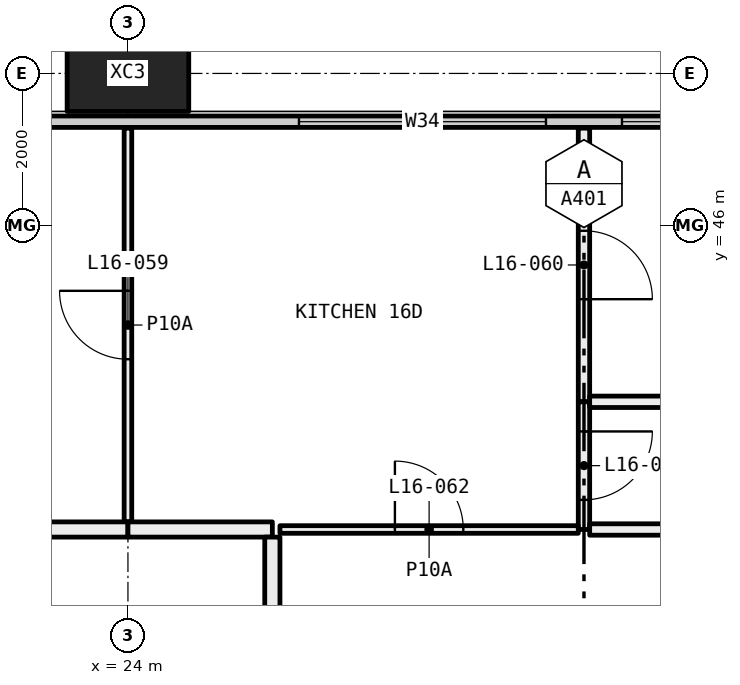
"""IFC4 building model, lengths in metres.
Left out: names, types, materials, properties, quantities, classifications, styles, units other than length and angle.
Written with IfcOpenShell. Run it as: python <this file> out.ifc"""

import sys

from ifc_helpers import new_model, si_unit, direction, frame, frame_2d, origin, origin_2d, place, context, subcontext, project, spatial, rectangle, hollow_rectangle, extrude, element, fill, save


model = new_model("IFC4")
c1 = context("Model", 3, precision=1e-05, world=origin(), true_north=direction((0.0, 1.0)))
c2 = subcontext(c1, "Body", "Model", "MODEL_VIEW")
j1 = project(units=[si_unit("LENGTHUNIT", "METRE"), si_unit("PLANEANGLEUNIT", "RADIAN")], contexts=[c1])
p1 = place(None, origin())
s1 = spatial("IfcSite", under=j1, at=p1, CompositionType="ELEMENT")
p2 = place(p1, origin())
s2 = spatial("IfcBuilding", under=s1, at=p2, CompositionType="ELEMENT")
p3 = place(p2, frame((0.0, 0.0, 67.95)))
s3 = spatial("IfcBuildingStorey", under=s2, at=p3, CompositionType="ELEMENT", Elevation=67.95)
p4 = place(p3, frame((24.0, 48.0, -0.4), z_axis=(0.0, 0.0, 1.0), x_axis=(1.0, 0.0, 0.0)))
e1 = element("IfcColumn", 1, at=p4, inside=s3, PredefinedType="COLUMN", context=c2, shape_type="SweptSolid", body=[
    extrude(hollow_rectangle(XDim=1.6, YDim=1.0, WallThickness=0.065, at=origin_2d()), origin(), (0.0, 0.0, 1.0), 3.45),
])
p5 = place(p3, frame((6.56, 47.365, 0.0), z_axis=(0.0, 0.0, 1.0), x_axis=(1.0, 0.0, 0.0)))
e2 = element("IfcWall", 2, at=p5, inside=s3, PredefinedType="ELEMENTEDWALL", context=c2, shape_type="SweptSolid", body=[
    extrude(rectangle(XDim=58.88, YDim=0.15, at=frame_2d((29.44, 0.0))), origin(), (0.0, 0.0, 1.0), 3.05),
])
p6 = place(p5, frame((0.44, 0.0, 0.45)))
e3 = element("IfcOpeningElement", 3, at=p6, cuts=e2, PredefinedType="OPENING", context=c2, shape_type="SweptSolid", body=[
    extrude(rectangle(XDim=4.5, YDim=2.55, at=frame_2d((2.25, 1.275))), frame((0.0, 0.085, 0.0), z_axis=(0.0, -1.0, 0.0), x_axis=(1.0, 0.0, 0.0)), (0.0, 0.0, 1.0), 0.17),
])
p7 = place(p5, frame((7.69, 0.0, 0.45)))
e4 = element("IfcOpeningElement", 4, at=p7, cuts=e2, PredefinedType="OPENING", context=c2, shape_type="SweptSolid", body=[
    extrude(rectangle(XDim=3.25, YDim=2.55, at=frame_2d((1.625, 1.275))), frame((0.0, 0.085, 0.0), z_axis=(0.0, -1.0, 0.0), x_axis=(1.0, 0.0, 0.0)), (0.0, 0.0, 1.0), 0.17),
])
p8 = place(p5, frame((11.94, 0.0, 0.45)))
e5 = element("IfcOpeningElement", 5, at=p8, cuts=e2, PredefinedType="OPENING", context=c2, shape_type="SweptSolid", body=[
    extrude(rectangle(XDim=3.25, YDim=2.55, at=frame_2d((1.625, 1.275))), frame((0.0, 0.085, 0.0), z_axis=(0.0, -1.0, 0.0), x_axis=(1.0, 0.0, 0.0)), (0.0, 0.0, 1.0), 0.17),
])
p9 = place(p5, frame((19.69, 0.0, 0.45)))
e6 = element("IfcOpeningElement", 6, at=p9, cuts=e2, PredefinedType="OPENING", context=c2, shape_type="SweptSolid", body=[
    extrude(rectangle(XDim=3.25, YDim=2.55, at=frame_2d((1.625, 1.275))), frame((0.0, 0.085, 0.0), z_axis=(0.0, -1.0, 0.0), x_axis=(1.0, 0.0, 0.0)), (0.0, 0.0, 1.0), 0.17),
])
p10 = place(p5, frame((23.94, 0.0, 0.45)))
e7 = element("IfcOpeningElement", 7, at=p10, cuts=e2, PredefinedType="OPENING", context=c2, shape_type="SweptSolid", body=[
    extrude(rectangle(XDim=2.0, YDim=2.55, at=frame_2d((1.0, 1.275))), frame((0.0, 0.085, 0.0), z_axis=(0.0, -1.0, 0.0), x_axis=(1.0, 0.0, 0.0)), (0.0, 0.0, 1.0), 0.17),
])
p11 = place(p5, frame((31.69, 0.0, 0.45)))
e8 = element("IfcOpeningElement", 8, at=p11, cuts=e2, PredefinedType="OPENING", context=c2, shape_type="SweptSolid", body=[
    extrude(rectangle(XDim=3.25, YDim=2.55, at=frame_2d((1.625, 1.275))), frame((0.0, 0.085, 0.0), z_axis=(0.0, -1.0, 0.0), x_axis=(1.0, 0.0, 0.0)), (0.0, 0.0, 1.0), 0.17),
])
p12 = place(p5, frame((35.94, 0.0, 0.45)))
e9 = element("IfcOpeningElement", 9, at=p12, cuts=e2, PredefinedType="OPENING", context=c2, shape_type="SweptSolid", body=[
    extrude(rectangle(XDim=3.25, YDim=2.55, at=frame_2d((1.625, 1.275))), frame((0.0, 0.085, 0.0), z_axis=(0.0, -1.0, 0.0), x_axis=(1.0, 0.0, 0.0)), (0.0, 0.0, 1.0), 0.17),
])
p13 = place(p5, frame((43.69, 0.0, 0.45)))
e10 = element("IfcOpeningElement", 10, at=p13, cuts=e2, PredefinedType="OPENING", context=c2, shape_type="SweptSolid", body=[
    extrude(rectangle(XDim=3.25, YDim=2.55, at=frame_2d((1.625, 1.275))), frame((0.0, 0.085, 0.0), z_axis=(0.0, -1.0, 0.0), x_axis=(1.0, 0.0, 0.0)), (0.0, 0.0, 1.0), 0.17),
])
p14 = place(p5, frame((47.94, 0.0, 0.45)))
e11 = element("IfcOpeningElement", 11, at=p14, cuts=e2, PredefinedType="OPENING", context=c2, shape_type="SweptSolid", body=[
    extrude(rectangle(XDim=2.0, YDim=2.55, at=frame_2d((1.0, 1.275))), frame((0.0, 0.085, 0.0), z_axis=(0.0, -1.0, 0.0), x_axis=(1.0, 0.0, 0.0)), (0.0, 0.0, 1.0), 0.17),
])
p15 = place(p5, frame((53.94, 0.0, 0.45)))
e12 = element("IfcOpeningElement", 12, at=p15, cuts=e2, PredefinedType="OPENING", context=c2, shape_type="SweptSolid", body=[
    extrude(rectangle(XDim=4.5, YDim=2.55, at=frame_2d((2.25, 1.275))), frame((0.0, 0.085, 0.0), z_axis=(0.0, -1.0, 0.0), x_axis=(1.0, 0.0, 0.0)), (0.0, 0.0, 1.0), 0.17),
])
p16 = place(p3, frame((24.0, 42.1, 0.0), z_axis=(0.0, 0.0, 1.0), x_axis=(0.0, 1.0, 0.0)))
e13 = element("IfcWall", 13, at=p16, inside=s3, PredefinedType="PARTITIONING", context=c2, shape_type="SweptSolid", body=[
    extrude(rectangle(XDim=5.18, YDim=0.1, at=frame_2d((2.59, 0.0))), origin(), (0.0, 0.0, 1.0), 3.05),
])
p17 = place(p16, frame((2.14, 0.0, 0.0)))
e14 = element("IfcOpeningElement", 14, at=p17, cuts=e13, PredefinedType="OPENING", context=c2, shape_type="SweptSolid", body=[
    extrude(rectangle(XDim=0.9, YDim=2.1, at=frame_2d((0.45, 1.05))), frame((0.0, 0.06, 0.0), z_axis=(0.0, -1.0, 0.0), x_axis=(1.0, 0.0, 0.0)), (0.0, 0.0, 1.0), 0.12),
])
p18 = place(p3, frame((18.0, 42.0, 0.0), z_axis=(0.0, 0.0, 1.0), x_axis=(1.0, 0.0, 0.0)))
e15 = element("IfcWall", 15, at=p18, inside=s3, PredefinedType="PARTITIONING", context=c2, shape_type="SweptSolid", body=[
    extrude(rectangle(XDim=6.0, YDim=0.2, at=frame_2d((3.0, 0.0))), origin(), (0.0, 0.0, 1.0), 3.05),
])
p19 = place(p3, frame((30.0, 43.68, 0.0), z_axis=(0.0, 0.0, 1.0), x_axis=(0.0, 1.0, 0.0)))
e16 = element("IfcWall", 16, at=p19, inside=s3, PredefinedType="PARTITIONING", context=c2, shape_type="SweptSolid", body=[
    extrude(rectangle(XDim=3.6, YDim=0.15, at=frame_2d((1.8, 0.0))), origin(), (0.0, 0.0, 1.0), 3.05),
])
p20 = place(p19, frame((1.35, 0.0, 0.0)))
e17 = element("IfcOpeningElement", 17, at=p20, cuts=e16, PredefinedType="OPENING", context=c2, shape_type="SweptSolid", body=[
    extrude(rectangle(XDim=0.9, YDim=2.1, at=frame_2d((0.45, 1.05))), frame((0.0, 0.085, 0.0), z_axis=(0.0, -1.0, 0.0), x_axis=(1.0, 0.0, 0.0)), (0.0, 0.0, 1.0), 0.17),
])
p21 = place(p3, frame((30.0, 42.0, 0.0), z_axis=(0.0, 0.0, 1.0), x_axis=(0.0, 1.0, 0.0)))
e18 = element("IfcWall", 18, at=p21, inside=s3, PredefinedType="PARTITIONING", context=c2, shape_type="SweptSolid", body=[
    extrude(rectangle(XDim=1.68, YDim=0.15, at=frame_2d((0.84, 0.0))), origin(), (0.0, 0.0, 1.0), 3.05),
])
p22 = place(p21, frame((0.39, 0.0, 0.0)))
e19 = element("IfcOpeningElement", 19, at=p22, cuts=e18, PredefinedType="OPENING", context=c2, shape_type="SweptSolid", body=[
    extrude(rectangle(XDim=0.9, YDim=2.1, at=frame_2d((0.45, 1.05))), frame((0.0, 0.085, 0.0), z_axis=(0.0, -1.0, 0.0), x_axis=(1.0, 0.0, 0.0)), (0.0, 0.0, 1.0), 0.17),
])
p23 = place(p3, frame((26.0, 42.0, 0.0), z_axis=(0.0, 0.0, 1.0), x_axis=(1.0, 0.0, 0.0)))
e20 = element("IfcWall", 20, at=p23, inside=s3, PredefinedType="PARTITIONING", context=c2, shape_type="SweptSolid", body=[
    extrude(rectangle(XDim=3.925, YDim=0.1, at=frame_2d((1.962, 0.0))), origin(), (0.0, 0.0, 1.0), 3.05),
])
p24 = place(p23, frame((1.512, 0.0, 0.0)))
e21 = element("IfcOpeningElement", 21, at=p24, cuts=e20, PredefinedType="OPENING", context=c2, shape_type="SweptSolid", body=[
    extrude(rectangle(XDim=0.9, YDim=2.1, at=frame_2d((0.45, 1.05))), frame((0.0, 0.06, 0.0), z_axis=(0.0, -1.0, 0.0), x_axis=(1.0, 0.0, 0.0)), (0.0, 0.0, 1.0), 0.12),
])
p25 = place(p3, frame((24.0, 42.0, 0.0), z_axis=(0.0, 0.0, 1.0), x_axis=(1.0, 0.0, 0.0)))
e22 = element("IfcWall", 22, at=p25, inside=s3, PredefinedType="PARTITIONING", context=c2, shape_type="SweptSolid", body=[
    extrude(rectangle(XDim=1.9, YDim=0.2, at=frame_2d((0.95, 0.0))), origin(), (0.0, 0.0, 1.0), 3.05),
])
p26 = place(p3, frame((30.075, 43.68, 0.0), z_axis=(0.0, 0.0, 1.0), x_axis=(1.0, 0.0, 0.0)))
e23 = element("IfcWall", 23, at=p26, inside=s3, PredefinedType="PARTITIONING", context=c2, shape_type="SweptSolid", body=[
    extrude(rectangle(XDim=5.925, YDim=0.15, at=frame_2d((2.962, 0.0))), origin(), (0.0, 0.0, 1.0), 2.45),
])
p27 = place(p3, frame((30.075, 42.0, 0.0), z_axis=(0.0, 0.0, 1.0), x_axis=(1.0, 0.0, 0.0)))
e24 = element("IfcWall", 24, at=p27, inside=s3, PredefinedType="PARTITIONING", context=c2, shape_type="SweptSolid", body=[
    extrude(rectangle(XDim=1.425, YDim=0.15, at=frame_2d((0.712, 0.0))), origin(), (0.0, 0.0, 1.0), 3.05),
])
p28 = place(p3, frame((25.9, 41.9, 0.0), z_axis=(0.0, 0.0, 1.0), x_axis=(0.0, -1.0, 0.0)))
e25 = element("IfcWall", 25, at=p28, inside=s3, PredefinedType="PARTITIONING", context=c2, shape_type="SweptSolid", body=[
    extrude(rectangle(XDim=6.2, YDim=0.2, at=frame_2d((3.1, 0.0))), origin(), (0.0, 0.0, 1.0), 2.45),
])
p29 = place(p9, origin())
e26 = element("IfcWindow", 26, at=p29, inside=s3, PartitioningType="SINGLE_PANEL", PredefinedType="WINDOW", context=c2, shape_type="SweptSolid", body=[
    extrude(rectangle(XDim=3.25, YDim=2.55, at=frame_2d((1.625, 1.275))), frame((0.0, 0.03, 0.0), z_axis=(0.0, -1.0, 0.0), x_axis=(1.0, 0.0, 0.0)), (0.0, 0.0, 1.0), 0.06),
])
fill(e6, e26)
p30 = place(p10, origin())
e27 = element("IfcWindow", 27, at=p30, inside=s3, PartitioningType="SINGLE_PANEL", PredefinedType="WINDOW", context=c2, shape_type="SweptSolid", body=[
    extrude(rectangle(XDim=2.0, YDim=2.55, at=frame_2d((1.0, 1.275))), frame((0.0, 0.03, 0.0), z_axis=(0.0, -1.0, 0.0), x_axis=(1.0, 0.0, 0.0)), (0.0, 0.0, 1.0), 0.06),
])
fill(e7, e27)
p31 = place(p17, origin())
e28 = element("IfcDoor", 28, at=p31, inside=s3, OperationType="SINGLE_SWING_LEFT", PredefinedType="DOOR", context=c2, shape_type="SweptSolid", body=[
    extrude(rectangle(XDim=0.9, YDim=2.1, at=frame_2d((0.45, 1.05))), frame((0.0, 0.025, 0.0), z_axis=(0.0, -1.0, 0.0), x_axis=(1.0, 0.0, 0.0)), (0.0, 0.0, 1.0), 0.05),
])
fill(e14, e28)
p32 = place(p20, frame((0.9, 0.0, 0.0), x_axis=(-1.0, 0.0, 0.0)))
e29 = element("IfcDoor", 29, at=p32, inside=s3, OperationType="SINGLE_SWING_LEFT", PredefinedType="DOOR", context=c2, shape_type="SweptSolid", body=[
    extrude(rectangle(XDim=0.9, YDim=2.1, at=frame_2d((0.45, 1.05))), frame((0.0, 0.025, 0.0), z_axis=(0.0, -1.0, 0.0), x_axis=(1.0, 0.0, 0.0)), (0.0, 0.0, 1.0), 0.05),
])
fill(e17, e29)
p33 = place(p22, frame((0.9, 0.0, 0.0), x_axis=(-1.0, 0.0, 0.0)))
e30 = element("IfcDoor", 30, at=p33, inside=s3, OperationType="SINGLE_SWING_RIGHT", PredefinedType="DOOR", context=c2, shape_type="SweptSolid", body=[
    extrude(rectangle(XDim=0.9, YDim=2.1, at=frame_2d((0.45, 1.05))), frame((0.0, 0.025, 0.0), z_axis=(0.0, -1.0, 0.0), x_axis=(1.0, 0.0, 0.0)), (0.0, 0.0, 1.0), 0.05),
])
fill(e19, e30)
p34 = place(p24, origin())
e31 = element("IfcDoor", 31, at=p34, inside=s3, OperationType="SINGLE_SWING_RIGHT", PredefinedType="DOOR", context=c2, shape_type="SweptSolid", body=[
    extrude(rectangle(XDim=0.9, YDim=2.1, at=frame_2d((0.45, 1.05))), frame((0.0, 0.025, 0.0), z_axis=(0.0, -1.0, 0.0), x_axis=(1.0, 0.0, 0.0)), (0.0, 0.0, 1.0), 0.05),
])
fill(e21, e31)
save(model, sys.argv[1])
